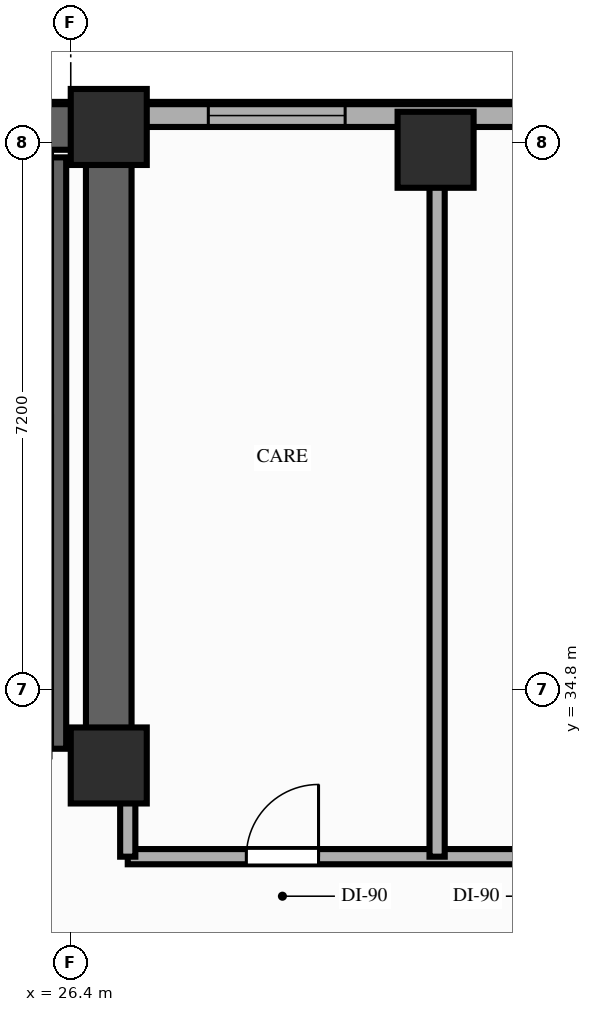
"""IFC4 building model, lengths in metres.
Left out: names, types, materials, properties, quantities, classifications, styles, units other than length and angle.
Written with IfcOpenShell. Run it as: python <this file> out.ifc"""

import sys

from ifc_helpers import new_model, si_unit, direction, frame, frame_2d, origin, origin_2d, place, context, subcontext, project, spatial, rectangle, extrude, element, fill, save


model = new_model("IFC4")
c1 = context("Model", 3, precision=1e-05, world=origin(), true_north=direction((0.0, 1.0)))
c2 = subcontext(c1, "Body", "Model", "MODEL_VIEW")
j1 = project(units=[si_unit("LENGTHUNIT", "METRE"), si_unit("PLANEANGLEUNIT", "RADIAN")], contexts=[c1])
p1 = place(None, origin())
s1 = spatial("IfcSite", under=j1, at=p1, CompositionType="ELEMENT")
p2 = place(p1, origin())
s2 = spatial("IfcBuilding", under=s1, at=p2, CompositionType="ELEMENT")
p3 = place(p2, frame((0.0, 0.0, 152.2)))
s3 = spatial("IfcBuildingStorey", under=s2, at=p3, CompositionType="ELEMENT", Elevation=152.2)
for number, where, z_axis, x_axis in (
    (1, (26.9, 33.8, 0.0), (0.0, 0.0, 1.0), (1.0, 0.0, 0.0)),
    (2, (26.9, 42.2, 0.0), (0.0, 0.0, 1.0), (1.0, 0.0, 0.0)),
    (3, (31.2, 41.9, 0.0), (0.0, 0.0, 1.0), (1.0, 0.0, 0.0)),
):
    element("IfcColumn", number, at=place(p3, frame(where, z_axis=z_axis, x_axis=x_axis)), inside=s3, PredefinedType="COLUMN", context=c2, shape_type="SweptSolid", body=[
        extrude(rectangle(XDim=1.0, YDim=1.0, at=origin_2d()), origin(), (0.0, 0.0, 1.0), 3.8),
    ])
p4 = place(p3, frame((46.4, 42.35, 0.0), z_axis=(0.0, 0.0, 1.0), x_axis=(-1.0, 0.0, 0.0)))
e4 = element("IfcWall", 4, at=p4, inside=s3, PredefinedType="STANDARD", context=c2, shape_type="SweptSolid", body=[
    extrude(rectangle(XDim=19.05, YDim=0.3, at=frame_2d((9.525, 0.0))), origin(), (0.0, 0.0, 1.0), 2.99),
])
p5 = place(p4, frame((16.39, 0.0, 0.85)))
e5 = element("IfcOpeningElement", 5, at=p5, cuts=e4, PredefinedType="OPENING", context=c2, shape_type="SweptSolid", body=[
    extrude(rectangle(XDim=1.8, YDim=1.75, at=frame_2d((0.9, 0.875))), frame((0.0, 0.16, 0.0), z_axis=(0.0, -1.0, 0.0), x_axis=(1.0, 0.0, 0.0)), (0.0, 0.0, 1.0), 0.32),
])
p6 = place(p3, frame((6.45, 42.2, 0.0), z_axis=(0.0, 0.0, 1.0), x_axis=(1.0, 0.0, 0.0)))
e6 = element("IfcWall", 6, at=p6, inside=s3, PredefinedType="SHEAR", context=c2, shape_type="SweptSolid", body=[
    extrude(rectangle(XDim=20.45, YDim=0.6, at=frame_2d((10.225, 0.0))), origin(), (0.0, 0.0, 1.0), 3.56),
])
p7 = place(p3, frame((26.9, 33.8, 0.0), z_axis=(0.0, 0.0, 1.0), x_axis=(0.0, 1.0, 0.0)))
e7 = element("IfcWall", 7, at=p7, inside=s3, PredefinedType="SHEAR", context=c2, shape_type="SweptSolid", body=[
    extrude(rectangle(XDim=7.95, YDim=0.6, at=frame_2d((3.975, 0.0))), origin(), (0.0, 0.0, 1.0), 3.56),
])
p8 = place(p3, frame((26.24, 34.02, 0.0), z_axis=(0.0, 0.0, 1.0), x_axis=(0.0, 1.0, 0.0)))
e8 = element("IfcWall", 8, at=p8, inside=s3, PredefinedType="SHEAR", context=c2, shape_type="SweptSolid", body=[
    extrude(rectangle(XDim=7.78, YDim=0.2, at=frame_2d((3.89, 0.0))), origin(), (0.0, 0.0, 1.0), 3.56),
])
p9 = place(p3, frame((27.15, 32.6, 0.0), z_axis=(0.0, 0.0, 1.0), x_axis=(1.0, 0.0, 0.0)))
e9 = element("IfcWall", 9, at=p9, inside=s3, PredefinedType="PARTITIONING", context=c2, shape_type="SweptSolid", body=[
    extrude(rectangle(XDim=14.55, YDim=0.2, at=frame_2d((7.275, 0.0))), origin(), (0.0, 0.0, 1.0), 2.99),
])
p10 = place(p9, frame((1.56, 0.0, 0.0)))
e10 = element("IfcOpeningElement", 10, at=p10, cuts=e9, PredefinedType="OPENING", context=c2, shape_type="SweptSolid", body=[
    extrude(rectangle(XDim=0.95, YDim=2.15, at=frame_2d((0.475, 1.075))), frame((0.0, 0.11, 0.0), z_axis=(0.0, -1.0, 0.0), x_axis=(1.0, 0.0, 0.0)), (0.0, 0.0, 1.0), 0.22),
])
p11 = place(p9, frame((5.19, 0.0, 0.0)))
e11 = element("IfcOpeningElement", 11, at=p11, cuts=e9, PredefinedType="OPENING", context=c2, shape_type="SweptSolid", body=[
    extrude(rectangle(XDim=0.95, YDim=2.15, at=frame_2d((0.475, 1.075))), frame((0.0, 0.11, 0.0), z_axis=(0.0, -1.0, 0.0), x_axis=(1.0, 0.0, 0.0)), (0.0, 0.0, 1.0), 0.22),
])
p12 = place(p9, frame((8.68, 0.0, 0.0)))
e12 = element("IfcOpeningElement", 12, at=p12, cuts=e9, PredefinedType="OPENING", context=c2, shape_type="SweptSolid", body=[
    extrude(rectangle(XDim=0.95, YDim=2.15, at=frame_2d((0.475, 1.075))), frame((0.0, 0.11, 0.0), z_axis=(0.0, -1.0, 0.0), x_axis=(1.0, 0.0, 0.0)), (0.0, 0.0, 1.0), 0.22),
])
p13 = place(p9, frame((12.32, 0.0, 0.0)))
e13 = element("IfcOpeningElement", 13, at=p13, cuts=e9, PredefinedType="OPENING", context=c2, shape_type="SweptSolid", body=[
    extrude(rectangle(XDim=0.95, YDim=2.15, at=frame_2d((0.475, 1.075))), frame((0.0, 0.11, 0.0), z_axis=(0.0, -1.0, 0.0), x_axis=(1.0, 0.0, 0.0)), (0.0, 0.0, 1.0), 0.22),
])
p14 = place(p3, frame((27.15, 32.6, 0.0), z_axis=(0.0, 0.0, 1.0), x_axis=(0.0, 1.0, 0.0)))
e14 = element("IfcWall", 14, at=p14, inside=s3, PredefinedType="PARTITIONING", context=c2, shape_type="SweptSolid", body=[
    extrude(rectangle(XDim=1.08, YDim=0.2, at=frame_2d((0.54, 0.0))), origin(), (0.0, 0.0, 1.0), 2.99),
])
p15 = place(p3, frame((31.22, 32.6, 0.0), z_axis=(0.0, 0.0, 1.0), x_axis=(0.0, 1.0, 0.0)))
e15 = element("IfcWall", 15, at=p15, inside=s3, PredefinedType="PARTITIONING", context=c2, shape_type="SweptSolid", body=[
    extrude(rectangle(XDim=9.6, YDim=0.2, at=frame_2d((4.8, 0.0))), origin(), (0.0, 0.0, 1.0), 2.99),
])
p16 = place(p5, origin())
e16 = element("IfcWindow", 16, at=p16, inside=s3, PartitioningType="SINGLE_PANEL", PredefinedType="WINDOW", context=c2, shape_type="SweptSolid", body=[
    extrude(rectangle(XDim=1.8, YDim=1.75, at=frame_2d((0.9, 0.875))), frame((0.0, 0.03, 0.0), z_axis=(0.0, -1.0, 0.0), x_axis=(1.0, 0.0, 0.0)), (0.0, 0.0, 1.0), 0.06),
])
fill(e5, e16)
p17 = place(p10, origin())
e17 = element("IfcDoor", 17, at=p17, inside=s3, OperationType="SINGLE_SWING_RIGHT", PredefinedType="DOOR", context=c2, shape_type="SweptSolid", body=[
    extrude(rectangle(XDim=0.95, YDim=2.15, at=frame_2d((0.475, 1.075))), frame((0.0, 0.025, 0.0), z_axis=(0.0, -1.0, 0.0), x_axis=(1.0, 0.0, 0.0)), (0.0, 0.0, 1.0), 0.05),
])
fill(e10, e17)
save(model, sys.argv[1])
